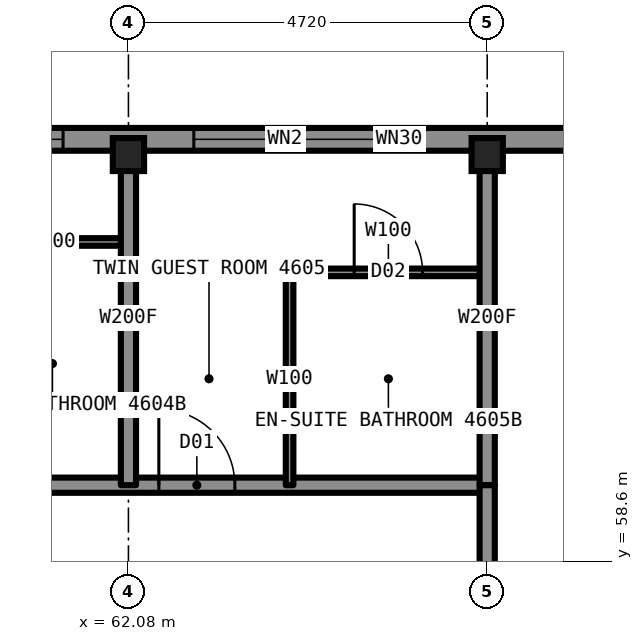
"""IFC4 building model, lengths in metres.
Left out: names, types, materials, properties, quantities, classifications, styles, units other than length and angle.
Written with IfcOpenShell. Run it as: python <this file> out.ifc"""

import sys

from ifc_helpers import new_model, si_unit, direction, frame, frame_2d, origin, origin_2d, place, context, subcontext, project, spatial, rectangle, i_section, extrude, element, fill, save


model = new_model("IFC4")
c1 = context("Model", 3, precision=1e-05, world=origin(), true_north=direction((0.0, 1.0)))
c2 = subcontext(c1, "Body", "Model", "MODEL_VIEW")
j1 = project(units=[si_unit("LENGTHUNIT", "METRE"), si_unit("PLANEANGLEUNIT", "RADIAN")], contexts=[c1])
p1 = place(None, origin())
s1 = spatial("IfcSite", under=j1, at=p1, CompositionType="ELEMENT")
p2 = place(p1, origin())
s2 = spatial("IfcBuilding", under=s1, at=p2, CompositionType="ELEMENT")
p3 = place(p2, frame((0.0, 0.0, 172.3)))
s3 = spatial("IfcBuildingStorey", under=s2, at=p3, CompositionType="ELEMENT", Elevation=172.3)
for number, where, z_axis, x_axis in (
    (1, (62.08, 63.95, 0.0), (0.0, 0.0, 1.0), (1.0, 0.0, 0.0)),
    (2, (66.8, 63.95, 0.0), (0.0, 0.0, 1.0), (1.0, 0.0, 0.0)),
):
    element("IfcColumn", number, at=place(p3, frame(where, z_axis=z_axis, x_axis=x_axis)), inside=s3, PredefinedType="COLUMN", context=c2, shape_type="SweptSolid", body=[
        extrude(i_section(OverallWidth=0.411, OverallDepth=0.434, WebThickness=0.036, FlangeThickness=0.057, at=origin_2d()), origin(), (0.0, 0.0, 1.0), 3.5),
    ])
p4 = place(p3, frame((43.2, 59.6, 0.0), z_axis=(0.0, 0.0, 1.0), x_axis=(1.0, 0.0, 0.0)))
e3 = element("IfcWall", 3, at=p4, inside=s3, PredefinedType="PARTITIONING", context=c2, shape_type="SweptSolid", body=[
    extrude(rectangle(XDim=23.6, YDim=0.2, at=frame_2d((11.8, 0.0))), origin(), (0.0, 0.0, 1.0), 3.33),
])
p5 = place(p4, frame((2.55, 0.0, 0.0)))
e4 = element("IfcOpeningElement", 4, at=p5, cuts=e3, PredefinedType="OPENING", context=c2, shape_type="SweptSolid", body=[
    extrude(rectangle(XDim=1.0, YDim=2.2, at=frame_2d((0.5, 1.1))), frame((0.0, 0.11, 0.0), z_axis=(0.0, -1.0, 0.0), x_axis=(1.0, 0.0, 0.0)), (0.0, 0.0, 1.0), 0.22),
])
p6 = place(p4, frame((6.18, 0.0, 0.0)))
e5 = element("IfcOpeningElement", 5, at=p6, cuts=e3, PredefinedType="OPENING", context=c2, shape_type="SweptSolid", body=[
    extrude(rectangle(XDim=1.0, YDim=2.2, at=frame_2d((0.5, 1.1))), frame((0.0, 0.11, 0.0), z_axis=(0.0, -1.0, 0.0), x_axis=(1.0, 0.0, 0.0)), (0.0, 0.0, 1.0), 0.22),
])
p7 = place(p4, frame((10.9, 0.0, 0.0)))
e6 = element("IfcOpeningElement", 6, at=p7, cuts=e3, PredefinedType="OPENING", context=c2, shape_type="SweptSolid", body=[
    extrude(rectangle(XDim=1.0, YDim=2.2, at=frame_2d((0.5, 1.1))), frame((0.0, 0.11, 0.0), z_axis=(0.0, -1.0, 0.0), x_axis=(1.0, 0.0, 0.0)), (0.0, 0.0, 1.0), 0.22),
])
p8 = place(p4, frame((15.62, 0.0, 0.0)))
e7 = element("IfcOpeningElement", 7, at=p8, cuts=e3, PredefinedType="OPENING", context=c2, shape_type="SweptSolid", body=[
    extrude(rectangle(XDim=1.0, YDim=2.2, at=frame_2d((0.5, 1.1))), frame((0.0, 0.11, 0.0), z_axis=(0.0, -1.0, 0.0), x_axis=(1.0, 0.0, 0.0)), (0.0, 0.0, 1.0), 0.22),
])
p9 = place(p4, frame((19.28, 0.0, 0.0)))
e8 = element("IfcOpeningElement", 8, at=p9, cuts=e3, PredefinedType="OPENING", context=c2, shape_type="SweptSolid", body=[
    extrude(rectangle(XDim=1.0, YDim=2.2, at=frame_2d((0.5, 1.1))), frame((0.0, 0.11, 0.0), z_axis=(0.0, -1.0, 0.0), x_axis=(1.0, 0.0, 0.0)), (0.0, 0.0, 1.0), 0.22),
])
p10 = place(p3, frame((64.2, 62.4, 0.0), z_axis=(0.0, 0.0, 1.0), x_axis=(1.0, 0.0, 0.0)))
e9 = element("IfcWall", 9, at=p10, inside=s3, PredefinedType="PARTITIONING", context=c2, shape_type="SweptSolid", body=[
    extrude(rectangle(XDim=2.6, YDim=0.1, at=frame_2d((1.3, 0.0))), origin(), (0.0, 0.0, 1.0), 3.33),
])
p11 = place(p10, frame((0.85, 0.0, 0.0)))
e10 = element("IfcOpeningElement", 10, at=p11, cuts=e9, PredefinedType="OPENING", context=c2, shape_type="SweptSolid", body=[
    extrude(rectangle(XDim=0.9, YDim=2.1, at=frame_2d((0.45, 1.05))), frame((0.0, 0.06, 0.0), z_axis=(0.0, -1.0, 0.0), x_axis=(1.0, 0.0, 0.0)), (0.0, 0.0, 1.0), 0.12),
])
p12 = place(p3, frame((60.08, 62.8, 0.0), z_axis=(0.0, 0.0, 1.0), x_axis=(1.0, 0.0, 0.0)))
e11 = element("IfcWall", 11, at=p12, inside=s3, PredefinedType="PARTITIONING", context=c2, shape_type="SweptSolid", body=[
    extrude(rectangle(XDim=2.0, YDim=0.1, at=frame_2d((1.0, 0.0))), origin(), (0.0, 0.0, 1.0), 3.33),
])
for number, where, z_axis, x_axis in (
    (12, (66.8, 59.6, 0.0), (0.0, 0.0, 1.0), (0.0, 1.0, 0.0)),
    (13, (62.08, 59.6, 0.0), (0.0, 0.0, 1.0), (0.0, 1.0, 0.0)),
):
    element("IfcWall", number, at=place(p3, frame(where, z_axis=z_axis, x_axis=x_axis)), inside=s3, PredefinedType="PARTITIONING", context=c2, shape_type="SweptSolid", body=[
        extrude(rectangle(XDim=4.4, YDim=0.2, at=frame_2d((2.2, 0.0))), origin(), (0.0, 0.0, 1.0), 2.573),
    ])
p13 = place(p3, frame((64.2, 59.6, 0.0), z_axis=(0.0, 0.0, 1.0), x_axis=(0.0, 1.0, 0.0)))
e14 = element("IfcWall", 14, at=p13, inside=s3, PredefinedType="PARTITIONING", context=c2, shape_type="SweptSolid", body=[
    extrude(rectangle(XDim=2.8, YDim=0.1, at=frame_2d((1.4, 0.0))), origin(), (0.0, 0.0, 1.0), 3.33),
])
p14 = place(p3, frame((68.8, 64.15, 0.0), z_axis=(0.0, 0.0, 1.0), x_axis=(-1.0, 0.0, 0.0)))
e15 = element("IfcWall", 15, at=p14, inside=s3, PredefinedType="SOLIDWALL", context=c2, shape_type="SweptSolid", body=[
    extrude(rectangle(XDim=27.6, YDim=0.3, at=frame_2d((13.8, 0.0))), origin(), (0.0, 0.0, 1.0), 2.83),
])
p15 = place(p14, frame((3.46, 0.0, 0.3)))
e16 = element("IfcOpeningElement", 16, at=p15, cuts=e15, PredefinedType="OPENING", context=c2, shape_type="SweptSolid", body=[
    extrude(rectangle(XDim=2.4, YDim=2.0, at=frame_2d((1.2, 1.0))), frame((0.0, 0.16, 0.0), z_axis=(0.0, -1.0, 0.0), x_axis=(1.0, 0.0, 0.0)), (0.0, 0.0, 1.0), 0.32),
])
p16 = place(p14, frame((7.58, 0.0, 0.3)))
e17 = element("IfcOpeningElement", 17, at=p16, cuts=e15, PredefinedType="OPENING", context=c2, shape_type="SweptSolid", body=[
    extrude(rectangle(XDim=3.0, YDim=2.0, at=frame_2d((1.5, 1.0))), frame((0.0, 0.16, 0.0), z_axis=(0.0, -1.0, 0.0), x_axis=(1.0, 0.0, 0.0)), (0.0, 0.0, 1.0), 0.32),
])
p17 = place(p14, frame((12.3, 0.0, 0.3)))
e18 = element("IfcOpeningElement", 18, at=p17, cuts=e15, PredefinedType="OPENING", context=c2, shape_type="SweptSolid", body=[
    extrude(rectangle(XDim=3.0, YDim=2.0, at=frame_2d((1.5, 1.0))), frame((0.0, 0.16, 0.0), z_axis=(0.0, -1.0, 0.0), x_axis=(1.0, 0.0, 0.0)), (0.0, 0.0, 1.0), 0.32),
])
p18 = place(p14, frame((17.02, 0.0, 0.3)))
e19 = element("IfcOpeningElement", 19, at=p18, cuts=e15, PredefinedType="OPENING", context=c2, shape_type="SweptSolid", body=[
    extrude(rectangle(XDim=3.0, YDim=2.0, at=frame_2d((1.5, 1.0))), frame((0.0, 0.16, 0.0), z_axis=(0.0, -1.0, 0.0), x_axis=(1.0, 0.0, 0.0)), (0.0, 0.0, 1.0), 0.32),
])
p19 = place(p14, frame((21.74, 0.0, 0.3)))
e20 = element("IfcOpeningElement", 20, at=p19, cuts=e15, PredefinedType="OPENING", context=c2, shape_type="SweptSolid", body=[
    extrude(rectangle(XDim=2.4, YDim=2.0, at=frame_2d((1.2, 1.0))), frame((0.0, 0.16, 0.0), z_axis=(0.0, -1.0, 0.0), x_axis=(1.0, 0.0, 0.0)), (0.0, 0.0, 1.0), 0.32),
])
p20 = place(p14, frame((2.86, 0.0, 0.3)))
e21 = element("IfcOpeningElement", 21, at=p20, cuts=e15, PredefinedType="OPENING", context=c2, shape_type="SweptSolid", body=[
    extrude(rectangle(XDim=0.6, YDim=1.1, at=frame_2d((0.3, 0.55))), frame((0.0, 0.16, 0.0), z_axis=(0.0, -1.0, 0.0), x_axis=(1.0, 0.0, 0.0)), (0.0, 0.0, 1.0), 0.32),
])
p21 = place(p14, frame((24.14, 0.0, 0.3)))
e22 = element("IfcOpeningElement", 22, at=p21, cuts=e15, PredefinedType="OPENING", context=c2, shape_type="SweptSolid", body=[
    extrude(rectangle(XDim=0.6, YDim=1.1, at=frame_2d((0.3, 0.55))), frame((0.0, 0.16, 0.0), z_axis=(0.0, -1.0, 0.0), x_axis=(1.0, 0.0, 0.0)), (0.0, 0.0, 1.0), 0.32),
])
p22 = place(p3, frame((66.8, 56.78, 0.0), z_axis=(0.0, 0.0, 1.0), x_axis=(0.0, 1.0, 0.0)))
e23 = element("IfcWall", 23, at=p22, inside=s3, PredefinedType="PARTITIONING", context=c2, shape_type="SweptSolid", body=[
    extrude(rectangle(XDim=2.82, YDim=0.2, at=frame_2d((1.41, 0.0))), origin(), (0.0, 0.0, 1.0), 2.573),
])
p23 = place(p9, origin())
e24 = element("IfcDoor", 24, at=p23, inside=s3, OperationType="SINGLE_SWING_LEFT", PredefinedType="DOOR", context=c2, shape_type="SweptSolid", body=[
    extrude(rectangle(XDim=1.0, YDim=2.2, at=frame_2d((0.5, 1.1))), frame((0.0, 0.025, 0.0), z_axis=(0.0, -1.0, 0.0), x_axis=(1.0, 0.0, 0.0)), (0.0, 0.0, 1.0), 0.05),
])
fill(e8, e24)
p24 = place(p11, origin())
e25 = element("IfcDoor", 25, at=p24, inside=s3, OperationType="SINGLE_SWING_RIGHT", PredefinedType="DOOR", context=c2, shape_type="SweptSolid", body=[
    extrude(rectangle(XDim=0.9, YDim=2.1, at=frame_2d((0.45, 1.05))), frame((0.0, 0.025, 0.0), z_axis=(0.0, -1.0, 0.0), x_axis=(1.0, 0.0, 0.0)), (0.0, 0.0, 1.0), 0.05),
])
fill(e10, e25)
p25 = place(p15, origin())
e26 = element("IfcWindow", 26, at=p25, inside=s3, PartitioningType="SINGLE_PANEL", PredefinedType="WINDOW", context=c2, shape_type="SweptSolid", body=[
    extrude(rectangle(XDim=2.4, YDim=2.0, at=frame_2d((1.2, 1.0))), frame((0.0, 0.13, 0.0), z_axis=(0.0, -1.0, 0.0), x_axis=(1.0, 0.0, 0.0)), (0.0, 0.0, 1.0), 0.06),
])
fill(e16, e26)
p26 = place(p16, origin())
e27 = element("IfcWindow", 27, at=p26, inside=s3, PartitioningType="SINGLE_PANEL", PredefinedType="WINDOW", context=c2, shape_type="SweptSolid", body=[
    extrude(rectangle(XDim=3.0, YDim=2.0, at=frame_2d((1.5, 1.0))), frame((0.0, 0.13, 0.0), z_axis=(0.0, -1.0, 0.0), x_axis=(1.0, 0.0, 0.0)), (0.0, 0.0, 1.0), 0.06),
])
fill(e17, e27)
p27 = place(p20, origin())
e28 = element("IfcWindow", 28, at=p27, inside=s3, PartitioningType="SINGLE_PANEL", PredefinedType="WINDOW", context=c2, shape_type="SweptSolid", body=[
    extrude(rectangle(XDim=0.6, YDim=1.1, at=frame_2d((0.3, 0.55))), frame((0.0, 0.13, 0.0), z_axis=(0.0, -1.0, 0.0), x_axis=(1.0, 0.0, 0.0)), (0.0, 0.0, 1.0), 0.06),
])
fill(e21, e28)
save(model, sys.argv[1])
